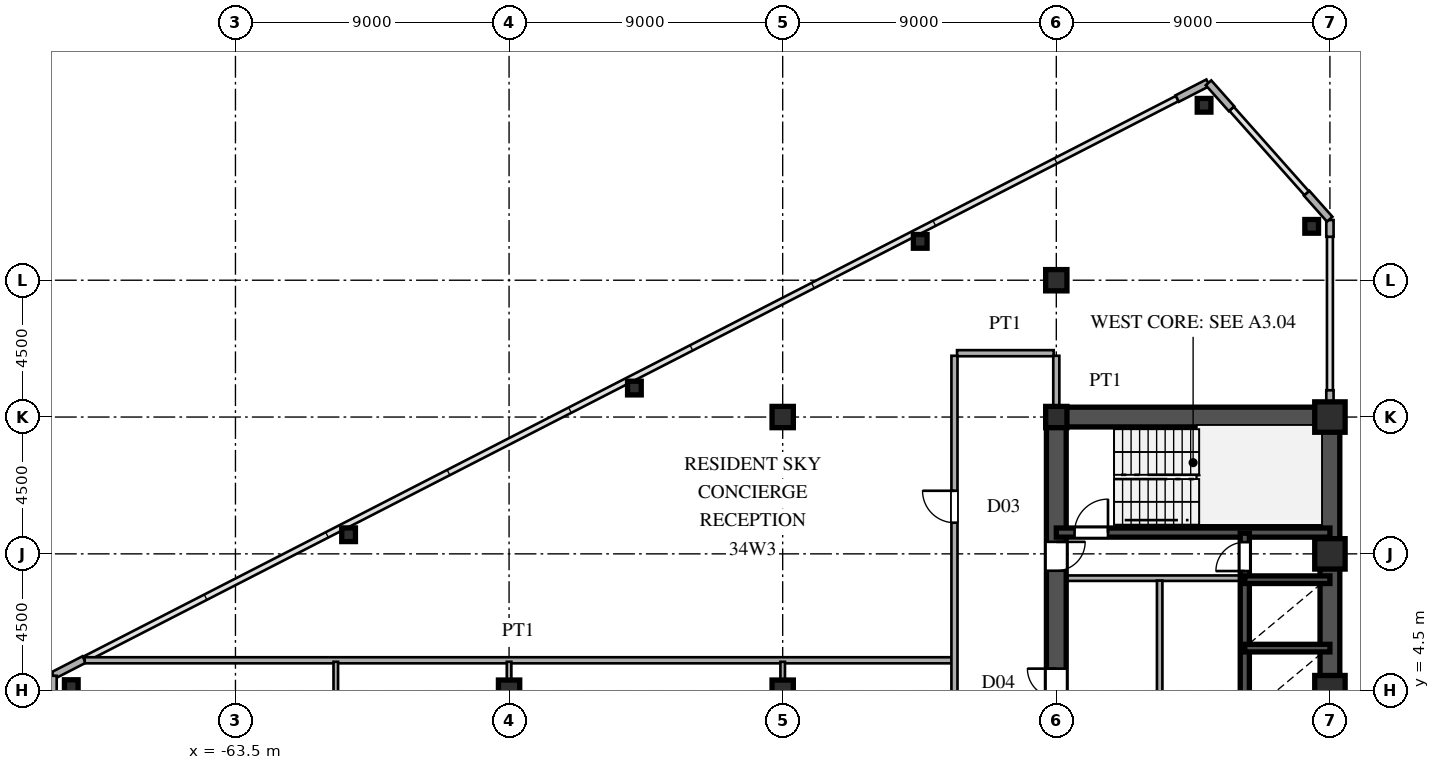
"""IFC4 building model, lengths in metres.
Left out: names, types, materials, properties, quantities, classifications, styles, units other than length and angle.
Written with IfcOpenShell. Run it as: python <this file> out.ifc"""

import sys

from ifc_helpers import new_model, si_unit, direction, frame, frame_2d, origin, origin_2d, place, context, subcontext, project, spatial, rectangle, hollow_rectangle, i_section, extrude, source, transform, mapped, element, fill, save


model = new_model("IFC4")
c1 = context("Model", 3, precision=1e-05, world=origin(), true_north=direction((0.0, 1.0)))
c2 = subcontext(c1, "Body", "Model", "MODEL_VIEW")
j1 = project(units=[si_unit("LENGTHUNIT", "METRE"), si_unit("PLANEANGLEUNIT", "RADIAN")], contexts=[c1])
p1 = place(None, origin())
s1 = spatial("IfcSite", under=j1, at=p1, CompositionType="ELEMENT")
p2 = place(p1, origin())
s2 = spatial("IfcBuilding", under=s1, at=p2, CompositionType="ELEMENT")
p3 = place(p2, frame((0.0, 0.0, 128.4)))
s3 = spatial("IfcBuildingStorey", under=s2, at=p3, CompositionType="ELEMENT", Elevation=128.4)
m1 = source(origin(), c2, "Body", "SweptSolid", [
    extrude(hollow_rectangle(XDim=1.0, YDim=1.0, WallThickness=0.042, at=origin_2d()), origin(), (0.0, 0.0, 1.0), 3.6),
])
for number, where, z_axis, x_axis in (
    (1, (-27.5, 4.5, 0.0), (0.0, 0.0, 1.0), (1.0, 0.0, 0.0)),
    (2, (-27.5, 9.0, 0.0), (0.0, 0.0, 1.0), (1.0, 0.0, 0.0)),
    (3, (-27.5, 13.5, 0.0), (0.0, 0.0, 1.0), (1.0, 0.0, 0.0)),
):
    element("IfcColumn", number, at=place(p3, frame(where, z_axis=z_axis, x_axis=x_axis)), inside=s3, PredefinedType="COLUMN", context=c2, shape_type="MappedRepresentation", body=[
        mapped(m1, transform((0.0, 0.0, 0.0), scale=1.0)),
    ])
m2 = source(origin(), c2, "Body", "SweptSolid", [
    extrude(i_section(OverallWidth=0.7, OverallDepth=0.7, WebThickness=0.028, FlangeThickness=0.045, at=origin_2d()), origin(), (0.0, 0.0, 1.0), 3.6),
])
for number, where, z_axis, x_axis in (
    (4, (-36.5, 13.5, 0.0), (0.0, 0.0, 1.0), (1.0, 0.0, 0.0)),
    (5, (-36.5, 18.0, 0.0), (0.0, 0.0, 1.0), (1.0, 0.0, 0.0)),
    (6, (-45.5, 4.5, 0.0), (0.0, 0.0, 1.0), (1.0, 0.0, 0.0)),
    (7, (-45.5, 13.5, 0.0), (0.0, 0.0, 1.0), (1.0, 0.0, 0.0)),
    (8, (-54.5, 4.5, 0.0), (0.0, 0.0, 1.0), (1.0, 0.0, 0.0)),
):
    element("IfcColumn", number, at=place(p3, frame(where, z_axis=z_axis, x_axis=x_axis)), inside=s3, PredefinedType="COLUMN", context=c2, shape_type="MappedRepresentation", body=[
        mapped(m2, transform((0.0, 0.0, 0.0), scale=1.0)),
    ])
m3 = source(origin(), c2, "Body", "SweptSolid", [
    extrude(hollow_rectangle(XDim=0.45, YDim=0.45, WallThickness=0.018, at=origin_2d()), origin(), (0.0, 0.0, 1.0), 3.6),
])
for number, where, z_axis, x_axis in (
    (9, (-28.1, 19.772, 0.0), (0.0, 0.0, 1.0), (1.0, 0.0, 0.0)),
    (10, (-31.64, 23.754, 0.0), (0.0, 0.0, 1.0), (1.0, 0.0, 0.0)),
    (11, (-68.9, 4.634, 0.0), (0.0, 0.0, 1.0), (1.0, 0.0, 0.0)),
    (12, (-40.976, 19.278, 0.0), (0.0, 0.0, 1.0), (1.0, 0.0, 0.0)),
    (13, (-50.377, 14.453, 0.0), (0.0, 0.0, 1.0), (1.0, 0.0, 0.0)),
    (14, (-59.779, 9.629, 0.0), (0.0, 0.0, 1.0), (1.0, 0.0, 0.0)),
):
    element("IfcColumn", number, at=place(p3, frame(where, z_axis=z_axis, x_axis=x_axis)), inside=s3, PredefinedType="COLUMN", context=c2, shape_type="MappedRepresentation", body=[
        mapped(m3, transform((0.0, 0.0, 0.0), scale=1.0)),
    ])
p4 = place(p3, frame((-27.5, 13.83, 0.0), z_axis=(0.0, 0.0, 1.0), x_axis=(0.0, 1.0, 0.0)))
e15 = element("IfcWall", 15, at=p4, inside=s3, PredefinedType="SOLIDWALL", context=c2, shape_type="SweptSolid", body=[
    extrude(rectangle(XDim=0.55, YDim=0.24, at=frame_2d((0.275, 0.0))), origin(), (0.0, 0.0, 1.0), 2.88),
])
p5 = place(p3, frame((-27.5, 19.43, 0.0), z_axis=(0.0, 0.0, 1.0), x_axis=(0.0, 1.0, 0.0)))
e16 = element("IfcWall", 16, at=p5, inside=s3, PredefinedType="SOLIDWALL", context=c2, shape_type="SweptSolid", body=[
    extrude(rectangle(XDim=0.55, YDim=0.24, at=frame_2d((0.275, 0.0))), origin(), (0.0, 0.0, 1.0), 3.38),
])
for number, where, z_axis, x_axis in (
    (17, (-27.507, 20.008, 0.0), (0.0, 0.0, 1.0), (-0.664, 0.747, 0.0)),
    (18, (-30.736, 23.64, 0.0), (0.0, 0.0, 1.0), (-0.664, 0.747, 0.0)),
):
    element("IfcWall", number, at=place(p3, frame(where, z_axis=z_axis, x_axis=x_axis)), inside=s3, PredefinedType="SOLIDWALL", context=c2, shape_type="SweptSolid", body=[
        extrude(rectangle(XDim=1.14, YDim=0.24, at=frame_2d((0.57, 0.0))), origin(), (0.0, 0.0, 1.0), 3.38),
    ])
for number, where, z_axis, x_axis in (
    (19, (-31.509, 24.495, 0.0), (0.0, 0.0, 1.0), (-0.89, -0.456, 0.0)),
    (20, (-68.477, 5.525, 0.0), (0.0, 0.0, 1.0), (-0.89, -0.456, 0.0)),
):
    element("IfcWall", number, at=place(p3, frame(where, z_axis=z_axis, x_axis=x_axis)), inside=s3, PredefinedType="SOLIDWALL", context=c2, shape_type="SweptSolid", body=[
        extrude(rectangle(XDim=1.14, YDim=0.24, at=frame_2d((0.57, 0.0))), origin(), (0.0, 0.0, 1.0), 3.38),
    ])
p6 = place(p3, frame((-69.5, 4.99, 0.0), z_axis=(0.0, 0.0, 1.0), x_axis=(0.0, -1.0, 0.0)))
e21 = element("IfcWall", 21, at=p6, inside=s3, PredefinedType="SOLIDWALL", context=c2, shape_type="SweptSolid", body=[
    extrude(rectangle(XDim=1.14, YDim=0.24, at=frame_2d((0.57, 0.0))), origin(), (0.0, 0.0, 1.0), 3.38),
])
p7 = place(p3, frame((-27.5, 1.3, 0.0), z_axis=(0.0, 0.0, 1.0), x_axis=(0.0, 1.0, 0.0)))
e22 = element("IfcWall", 22, at=p7, inside=s3, PredefinedType="SHEAR", context=c2, shape_type="SweptSolid", body=[
    extrude(rectangle(XDim=12.2, YDim=0.65, at=frame_2d((6.1, 0.0))), origin(), (0.0, 0.0, 1.0), 3.38),
])
p8 = place(p3, frame((-36.5, 13.5, 0.0), z_axis=(0.0, 0.0, 1.0), x_axis=(1.0, 0.0, 0.0)))
e23 = element("IfcWall", 23, at=p8, inside=s3, PredefinedType="SHEAR", context=c2, shape_type="SweptSolid", body=[
    extrude(rectangle(XDim=9.0, YDim=0.65, at=frame_2d((4.5, 0.0))), origin(), (0.0, 0.0, 1.0), 3.38),
])
p9 = place(p3, frame((-36.5, 8.2, 0.0), z_axis=(0.0, 0.0, 1.0), x_axis=(0.0, 1.0, 0.0)))
e24 = element("IfcWall", 24, at=p9, inside=s3, PredefinedType="SHEAR", context=c2, shape_type="SweptSolid", body=[
    extrude(rectangle(XDim=5.45, YDim=0.65, at=frame_2d((2.725, 0.0))), origin(), (0.0, 0.0, 1.0), 3.38),
])
p10 = place(p9, frame((0.245, 0.0, 0.0)))
e25 = element("IfcOpeningElement", 25, at=p10, cuts=e24, PredefinedType="OPENING", context=c2, shape_type="SweptSolid", body=[
    extrude(rectangle(XDim=0.95, YDim=2.15, at=frame_2d((0.475, 1.075))), frame((0.0, 0.335, 0.0), z_axis=(0.0, -1.0, 0.0), x_axis=(1.0, 0.0, 0.0)), (0.0, 0.0, 1.0), 0.67),
])
p11 = place(p3, frame((-36.5, 1.3, 0.0), z_axis=(0.0, 0.0, 1.0), x_axis=(0.0, 1.0, 0.0)))
e26 = element("IfcWall", 26, at=p11, inside=s3, PredefinedType="SHEAR", context=c2, shape_type="SweptSolid", body=[
    extrude(rectangle(XDim=6.9, YDim=0.65, at=frame_2d((3.45, 0.0))), origin(), (0.0, 0.0, 1.0), 3.38),
])
p12 = place(p11, frame((2.975, 0.0, 0.0)))
e27 = element("IfcOpeningElement", 27, at=p12, cuts=e26, PredefinedType="OPENING", context=c2, shape_type="SweptSolid", body=[
    extrude(rectangle(XDim=0.95, YDim=2.15, at=frame_2d((0.475, 1.075))), frame((0.0, 0.335, 0.0), z_axis=(0.0, -1.0, 0.0), x_axis=(1.0, 0.0, 0.0)), (0.0, 0.0, 1.0), 0.67),
])
p13 = place(p3, frame((-36.5, 9.7, 0.0), z_axis=(0.0, 0.0, 1.0), x_axis=(1.0, 0.0, 0.0)))
e28 = element("IfcWall", 28, at=p13, inside=s3, PredefinedType="SHEAR", context=c2, shape_type="SweptSolid", body=[
    extrude(rectangle(XDim=9.0, YDim=0.3, at=frame_2d((4.5, 0.0))), origin(), (0.0, 0.0, 1.0), 3.38),
])
p14 = place(p13, frame((0.6, 0.0, 0.0)))
e29 = element("IfcOpeningElement", 29, at=p14, cuts=e28, PredefinedType="OPENING", context=c2, shape_type="SweptSolid", body=[
    extrude(rectangle(XDim=1.1, YDim=2.2, at=frame_2d((0.55, 1.1))), frame((0.0, 0.16, 0.0), z_axis=(0.0, -1.0, 0.0), x_axis=(1.0, 0.0, 0.0)), (0.0, 0.0, 1.0), 0.32),
])
for number, where, z_axis, x_axis in (
    (30, (-30.3, 5.9, 0.0), (0.0, 0.0, 1.0), (1.0, 0.0, 0.0)),
    (31, (-30.3, 8.15, 0.0), (0.0, 0.0, 1.0), (1.0, 0.0, 0.0)),
):
    element("IfcWall", number, at=place(p3, frame(where, z_axis=z_axis, x_axis=x_axis)), inside=s3, PredefinedType="SHEAR", context=c2, shape_type="SweptSolid", body=[
        extrude(rectangle(XDim=2.8, YDim=0.25, at=frame_2d((1.4, 0.0))), origin(), (0.0, 0.0, 1.0), 3.38),
    ])
p15 = place(p3, frame((-30.3, 3.6, 0.0), z_axis=(0.0, 0.0, 1.0), x_axis=(0.0, 1.0, 0.0)))
e32 = element("IfcWall", 32, at=p15, inside=s3, PredefinedType="SHEAR", context=c2, shape_type="SweptSolid", body=[
    extrude(rectangle(XDim=2.3, YDim=0.3, at=frame_2d((1.15, 0.0))), origin(), (0.0, 0.0, 1.0), 3.38),
])
p16 = place(p3, frame((-30.3, 5.9, 0.0), z_axis=(0.0, 0.0, 1.0), x_axis=(0.0, 1.0, 0.0)))
e33 = element("IfcWall", 33, at=p16, inside=s3, PredefinedType="SHEAR", context=c2, shape_type="SweptSolid", body=[
    extrude(rectangle(XDim=2.25, YDim=0.3, at=frame_2d((1.125, 0.0))), origin(), (0.0, 0.0, 1.0), 3.38),
])
p17 = place(p3, frame((-30.3, 8.15, 0.0), z_axis=(0.0, 0.0, 1.0), x_axis=(0.0, 1.0, 0.0)))
e34 = element("IfcWall", 34, at=p17, inside=s3, PredefinedType="SHEAR", context=c2, shape_type="SweptSolid", body=[
    extrude(rectangle(XDim=1.53, YDim=0.3, at=frame_2d((0.765, 0.0))), origin(), (0.0, 0.0, 1.0), 3.38),
])
p18 = place(p17, frame((0.285, 0.0, 0.0)))
e35 = element("IfcOpeningElement", 35, at=p18, cuts=e34, PredefinedType="OPENING", context=c2, shape_type="SweptSolid", body=[
    extrude(rectangle(XDim=0.95, YDim=2.15, at=frame_2d((0.475, 1.075))), frame((0.0, 0.16, 0.0), z_axis=(0.0, -1.0, 0.0), x_axis=(1.0, 0.0, 0.0)), (0.0, 0.0, 1.0), 0.32),
])
p19 = place(p3, frame((-36.15, 8.2, 0.0), z_axis=(0.0, 0.0, 1.0), x_axis=(1.0, 0.0, 0.0)))
e36 = element("IfcWall", 36, at=p19, inside=s3, PredefinedType="PARTITIONING", context=c2, shape_type="SweptSolid", body=[
    extrude(rectangle(XDim=5.7, YDim=0.18, at=frame_2d((2.85, 0.0))), origin(), (0.0, 0.0, 1.0), 3.38),
])
p20 = place(p3, frame((-33.1, 1.38, 0.0), z_axis=(0.0, 0.0, 1.0), x_axis=(0.0, 1.0, 0.0)))
e37 = element("IfcWall", 37, at=p20, inside=s3, PredefinedType="PARTITIONING", context=c2, shape_type="SweptSolid", body=[
    extrude(rectangle(XDim=6.74, YDim=0.18, at=frame_2d((3.37, 0.0))), origin(), (0.0, 0.0, 1.0), 3.38),
])
p21 = place(p3, frame((-68.458, 5.5, 0.0), z_axis=(0.0, 0.0, 1.0), x_axis=(1.0, 0.0, 0.0)))
e38 = element("IfcWall", 38, at=p21, inside=s3, PredefinedType="PARTITIONING", context=c2, shape_type="SweptSolid", body=[
    extrude(rectangle(XDim=28.529, YDim=0.2, at=frame_2d((14.264, 0.0))), origin(), (0.0, 0.0, 1.0), 3.38),
])
p22 = place(p3, frame((-39.765, 15.6, 0.0), z_axis=(0.0, 0.0, 1.0), x_axis=(1.0, 0.0, 0.0)))
e39 = element("IfcWall", 39, at=p22, inside=s3, PredefinedType="PARTITIONING", context=c2, shape_type="SweptSolid", body=[
    extrude(rectangle(XDim=3.18, YDim=0.2, at=frame_2d((1.59, 0.0))), origin(), (0.0, 0.0, 1.0), 3.38),
])
p23 = place(p3, frame((-60.2, -8.45, 0.0), z_axis=(0.0, 0.0, 1.0), x_axis=(0.0, 1.0, 0.0)))
e40 = element("IfcWall", 40, at=p23, inside=s3, PredefinedType="PARTITIONING", context=c2, shape_type="SweptSolid", body=[
    extrude(rectangle(XDim=13.9, YDim=0.15, at=frame_2d((6.95, 0.0))), origin(), (0.0, 0.0, 1.0), 3.38),
])
p24 = place(p23, frame((1.808, 0.0, 0.0)))
e41 = element("IfcOpeningElement", 41, at=p24, cuts=e40, PredefinedType="OPENING", context=c2, shape_type="SweptSolid", body=[
    extrude(rectangle(XDim=0.95, YDim=2.15, at=frame_2d((0.475, 1.075))), frame((0.0, 0.085, 0.0), z_axis=(0.0, -1.0, 0.0), x_axis=(1.0, 0.0, 0.0)), (0.0, 0.0, 1.0), 0.17),
])
p25 = place(p23, frame((6.475, 0.0, 0.0)))
e42 = element("IfcOpeningElement", 42, at=p25, cuts=e40, PredefinedType="OPENING", context=c2, shape_type="SweptSolid", body=[
    extrude(rectangle(XDim=0.95, YDim=2.15, at=frame_2d((0.475, 1.075))), frame((0.0, 0.085, 0.0), z_axis=(0.0, -1.0, 0.0), x_axis=(1.0, 0.0, 0.0)), (0.0, 0.0, 1.0), 0.17),
])
p26 = place(p23, frame((11.142, 0.0, 0.0)))
e43 = element("IfcOpeningElement", 43, at=p26, cuts=e40, PredefinedType="OPENING", context=c2, shape_type="SweptSolid", body=[
    extrude(rectangle(XDim=0.95, YDim=2.15, at=frame_2d((0.475, 1.075))), frame((0.0, 0.085, 0.0), z_axis=(0.0, -1.0, 0.0), x_axis=(1.0, 0.0, 0.0)), (0.0, 0.0, 1.0), 0.17),
])
p27 = place(p3, frame((-54.5, -8.45, 0.0), z_axis=(0.0, 0.0, 1.0), x_axis=(0.0, 1.0, 0.0)))
e44 = element("IfcWall", 44, at=p27, inside=s3, PredefinedType="PARTITIONING", context=c2, shape_type="SweptSolid", body=[
    extrude(rectangle(XDim=13.9, YDim=0.15, at=frame_2d((6.95, 0.0))), origin(), (0.0, 0.0, 1.0), 2.78),
])
p28 = place(p27, frame((6.475, 0.0, 0.0)))
e45 = element("IfcOpeningElement", 45, at=p28, cuts=e44, PredefinedType="OPENING", context=c2, shape_type="SweptSolid", body=[
    extrude(rectangle(XDim=0.95, YDim=2.15, at=frame_2d((0.475, 1.075))), frame((0.0, 0.085, 0.0), z_axis=(0.0, -1.0, 0.0), x_axis=(1.0, 0.0, 0.0)), (0.0, 0.0, 1.0), 0.17),
])
p29 = place(p3, frame((-45.5, 1.352, 0.0), z_axis=(0.0, 0.0, 1.0), x_axis=(0.0, 1.0, 0.0)))
e46 = element("IfcWall", 46, at=p29, inside=s3, PredefinedType="PARTITIONING", context=c2, shape_type="SweptSolid", body=[
    extrude(rectangle(XDim=4.098, YDim=0.15, at=frame_2d((2.049, 0.0))), origin(), (0.0, 0.0, 1.0), 2.78),
])
p30 = place(p3, frame((-39.85, -15.515, 0.0), z_axis=(0.0, 0.0, 1.0), x_axis=(0.0, 1.0, 0.0)))
e47 = element("IfcWall", 47, at=p30, inside=s3, PredefinedType="PARTITIONING", context=c2, shape_type="SweptSolid", body=[
    extrude(rectangle(XDim=31.03, YDim=0.2, at=frame_2d((15.515, 0.0))), origin(), (0.0, 0.0, 1.0), 3.38),
])
p31 = place(p30, frame((2.94, 0.0, 0.0)))
e48 = element("IfcOpeningElement", 48, at=p31, cuts=e47, PredefinedType="OPENING", context=c2, shape_type="SweptSolid", body=[
    extrude(rectangle(XDim=1.05, YDim=2.25, at=frame_2d((0.525, 1.125))), frame((0.0, 0.11, 0.0), z_axis=(0.0, -1.0, 0.0), x_axis=(1.0, 0.0, 0.0)), (0.0, 0.0, 1.0), 0.22),
])
p32 = place(p30, frame((13.28, 0.0, 0.0)))
e49 = element("IfcOpeningElement", 49, at=p32, cuts=e47, PredefinedType="OPENING", context=c2, shape_type="SweptSolid", body=[
    extrude(rectangle(XDim=1.05, YDim=2.25, at=frame_2d((0.525, 1.125))), frame((0.0, 0.11, 0.0), z_axis=(0.0, -1.0, 0.0), x_axis=(1.0, 0.0, 0.0)), (0.0, 0.0, 1.0), 0.22),
])
p33 = place(p30, frame((25.54, 0.0, 0.0)))
e50 = element("IfcOpeningElement", 50, at=p33, cuts=e47, PredefinedType="OPENING", context=c2, shape_type="SweptSolid", body=[
    extrude(rectangle(XDim=1.05, YDim=2.25, at=frame_2d((0.525, 1.125))), frame((0.0, 0.11, 0.0), z_axis=(0.0, -1.0, 0.0), x_axis=(1.0, 0.0, 0.0)), (0.0, 0.0, 1.0), 0.22),
])
p34 = place(p3, frame((-36.5, 13.83, 0.0), z_axis=(0.0, 0.0, 1.0), x_axis=(0.0, 1.0, 0.0)))
e51 = element("IfcWall", 51, at=p34, inside=s3, PredefinedType="PARTITIONING", context=c2, shape_type="SweptSolid", body=[
    extrude(rectangle(XDim=1.685, YDim=0.2, at=frame_2d((0.842, 0.0))), origin(), (0.0, 0.0, 1.0), 2.78),
])
m4 = source(origin(), c2, "Body", "SweptSolid", [
    extrude(rectangle(XDim=0.95, YDim=2.15, at=frame_2d((0.475, 1.075))), frame((0.0, 0.025, 0.0), z_axis=(0.0, -1.0, 0.0), x_axis=(1.0, 0.0, 0.0)), (0.0, 0.0, 1.0), 0.05),
])
p35 = place(p10, frame((0.95, 0.0, 0.0), z_axis=(0.0, 0.0, 1.0), x_axis=(-1.0, 0.0, 0.0)))
e52 = element("IfcDoor", 52, at=p35, inside=s3, OperationType="SINGLE_SWING_RIGHT", PredefinedType="DOOR", context=c2, shape_type="MappedRepresentation", body=[
    mapped(m4, transform((0.0, 0.0, 0.0), scale=1.0)),
])
fill(e25, e52)
p36 = place(p12, origin())
e53 = element("IfcDoor", 53, at=p36, inside=s3, OperationType="SINGLE_SWING_RIGHT", PredefinedType="DOOR", context=c2, shape_type="MappedRepresentation", body=[
    mapped(m4, transform((0.0, 0.0, 0.0), scale=1.0)),
])
fill(e27, e53)
m5 = source(origin(), c2, "Body", "SweptSolid", [
    extrude(rectangle(XDim=1.1, YDim=2.2, at=frame_2d((0.55, 1.1))), frame((0.0, 0.025, 0.0), z_axis=(0.0, -1.0, 0.0), x_axis=(1.0, 0.0, 0.0)), (0.0, 0.0, 1.0), 0.05),
])
p37 = place(p14, origin())
e54 = element("IfcDoor", 54, at=p37, inside=s3, OperationType="SINGLE_SWING_RIGHT", PredefinedType="DOOR", context=c2, shape_type="MappedRepresentation", body=[
    mapped(m5, transform((0.0, 0.0, 0.0), scale=1.0)),
])
fill(e29, e54)
p38 = place(p18, origin())
e55 = element("IfcDoor", 55, at=p38, inside=s3, OperationType="SINGLE_SWING_LEFT", PredefinedType="DOOR", context=c2, shape_type="MappedRepresentation", body=[
    mapped(m4, transform((0.0, 0.0, 0.0), scale=1.0)),
])
fill(e35, e55)
m6 = source(origin(), c2, "Body", "SweptSolid", [
    extrude(rectangle(XDim=1.05, YDim=2.25, at=frame_2d((0.525, 1.125))), frame((0.0, 0.025, 0.0), z_axis=(0.0, -1.0, 0.0), x_axis=(1.0, 0.0, 0.0)), (0.0, 0.0, 1.0), 0.05),
])
p39 = place(p33, origin())
e56 = element("IfcDoor", 56, at=p39, inside=s3, OperationType="SINGLE_SWING_RIGHT", PredefinedType="DOOR", context=c2, shape_type="MappedRepresentation", body=[
    mapped(m6, transform((0.0, 0.0, 0.0), scale=1.0)),
])
fill(e50, e56)
save(model, sys.argv[1])
